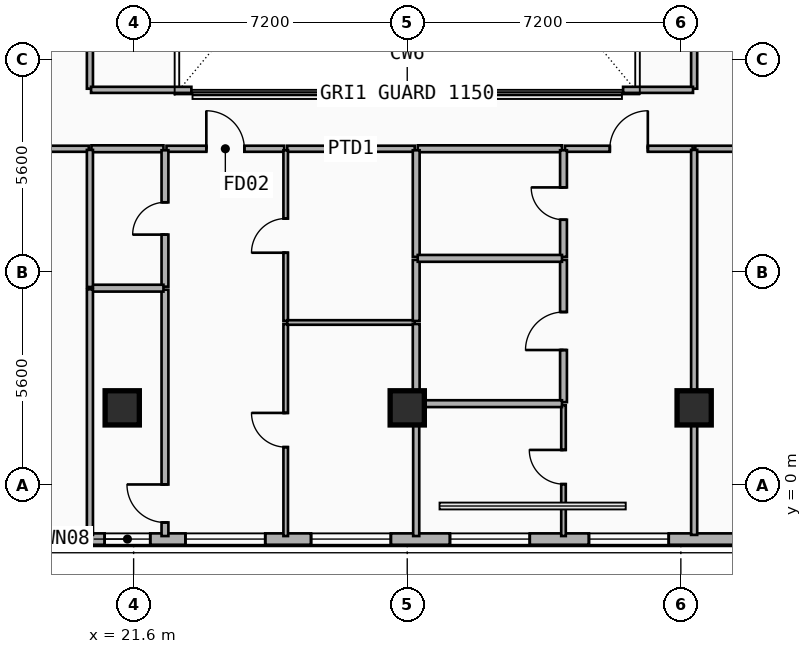
"""IFC4 building model, lengths in metres.
Left out: names, types, materials, properties, quantities, classifications, styles, units other than length and angle.
Written with IfcOpenShell. Run it as: python <this file> out.ifc"""

import sys

from ifc_helpers import new_model, si_unit, direction, frame, frame_2d, origin, origin_2d, place, context, subcontext, project, spatial, rectangle, extrude, element, fill, save


model = new_model("IFC4")
c1 = context("Model", 3, precision=1e-05, world=origin(), true_north=direction((0.0, 1.0)))
c2 = subcontext(c1, "Body", "Model", "MODEL_VIEW")
j1 = project(units=[si_unit("LENGTHUNIT", "METRE"), si_unit("PLANEANGLEUNIT", "RADIAN")], contexts=[c1])
p1 = place(None, origin())
s1 = spatial("IfcSite", under=j1, at=p1, CompositionType="ELEMENT")
p2 = place(p1, origin())
s2 = spatial("IfcBuilding", under=s1, at=p2, CompositionType="ELEMENT")
p3 = place(p2, frame((0.0, 0.0, 265.8)))
s3 = spatial("IfcBuildingStorey", under=s2, at=p3, CompositionType="ELEMENT", Elevation=265.8)
for number, where, z_axis, x_axis in (
    (1, (21.3, 2.141, 0.0), (0.0, -0.09, 0.996), (1.0, 0.0, 0.0)),
    (2, (28.8, 2.141, 0.0), (0.0, -0.09, 0.996), (1.0, 0.0, 0.0)),
    (3, (36.35, 2.141, 0.0), (0.0, -0.09, 0.996), (1.0, 0.0, 0.0)),
):
    element("IfcColumn", number, at=place(p3, frame(where, z_axis=z_axis, x_axis=x_axis)), inside=s3, PredefinedType="COLUMN", context=c2, shape_type="SweptSolid", body=[
        extrude(rectangle(XDim=0.9, YDim=0.9, at=origin_2d()), origin(), (0.0, 0.0, 1.0), 3.715),
    ])
p4 = place(p3, frame((45.2, -1.42, 0.0), z_axis=(0.0, 0.0, 1.0), x_axis=(-1.0, 0.0, 0.0)))
e4 = element("IfcWall", 4, at=p4, inside=s3, PredefinedType="SOLIDWALL", context=c2, shape_type="SweptSolid", body=[
    extrude(rectangle(XDim=32.8, YDim=0.3, at=frame_2d((16.4, 0.0))), origin(), (0.0, 0.0, 1.0), 3.42),
])
p5 = place(p4, frame((27.825, 0.0, 0.75)))
e5 = element("IfcOpeningElement", 5, at=p5, cuts=e4, PredefinedType="OPENING", context=c2, shape_type="SweptSolid", body=[
    extrude(rectangle(XDim=2.1, YDim=2.1, at=frame_2d((1.05, 1.05))), frame((0.0, 0.16, 0.0), z_axis=(0.0, -1.0, 0.0), x_axis=(1.0, 0.0, 0.0)), (0.0, 0.0, 1.0), 0.32),
])
p6 = place(p4, frame((20.136, 0.0, 0.75)))
e6 = element("IfcOpeningElement", 6, at=p6, cuts=e4, PredefinedType="OPENING", context=c2, shape_type="SweptSolid", body=[
    extrude(rectangle(XDim=2.1, YDim=2.1, at=frame_2d((1.05, 1.05))), frame((0.0, 0.16, 0.0), z_axis=(0.0, -1.0, 0.0), x_axis=(1.0, 0.0, 0.0)), (0.0, 0.0, 1.0), 0.32),
])
p7 = place(p4, frame((23.163, 0.0, 0.68)))
e7 = element("IfcOpeningElement", 7, at=p7, cuts=e4, PredefinedType="OPENING", context=c2, shape_type="SweptSolid", body=[
    extrude(rectangle(XDim=1.2, YDim=1.5, at=frame_2d((0.6, 0.75))), frame((0.0, 0.16, 0.0), z_axis=(0.0, -1.0, 0.0), x_axis=(1.0, 0.0, 0.0)), (0.0, 0.0, 1.0), 0.32),
])
p8 = place(p4, frame((16.831, 0.0, 0.75)))
e8 = element("IfcOpeningElement", 8, at=p8, cuts=e4, PredefinedType="OPENING", context=c2, shape_type="SweptSolid", body=[
    extrude(rectangle(XDim=2.1, YDim=2.1, at=frame_2d((1.05, 1.05))), frame((0.0, 0.16, 0.0), z_axis=(0.0, -1.0, 0.0), x_axis=(1.0, 0.0, 0.0)), (0.0, 0.0, 1.0), 0.32),
])
p9 = place(p4, frame((9.519, 0.0, 0.75)))
e9 = element("IfcOpeningElement", 9, at=p9, cuts=e4, PredefinedType="OPENING", context=c2, shape_type="SweptSolid", body=[
    extrude(rectangle(XDim=2.1, YDim=2.1, at=frame_2d((1.05, 1.05))), frame((0.0, 0.16, 0.0), z_axis=(0.0, -1.0, 0.0), x_axis=(1.0, 0.0, 0.0)), (0.0, 0.0, 1.0), 0.32),
])
p10 = place(p4, frame((13.176, 0.0, 0.75)))
e10 = element("IfcOpeningElement", 10, at=p10, cuts=e4, PredefinedType="OPENING", context=c2, shape_type="SweptSolid", body=[
    extrude(rectangle(XDim=2.1, YDim=2.1, at=frame_2d((1.05, 1.05))), frame((0.0, 0.16, 0.0), z_axis=(0.0, -1.0, 0.0), x_axis=(1.0, 0.0, 0.0)), (0.0, 0.0, 1.0), 0.32),
])
p11 = place(p4, frame((2.875, 0.0, 0.75)))
e11 = element("IfcOpeningElement", 11, at=p11, cuts=e4, PredefinedType="OPENING", context=c2, shape_type="SweptSolid", body=[
    extrude(rectangle(XDim=2.1, YDim=2.1, at=frame_2d((1.05, 1.05))), frame((0.0, 0.16, 0.0), z_axis=(0.0, -1.0, 0.0), x_axis=(1.0, 0.0, 0.0)), (0.0, 0.0, 1.0), 0.32),
])
p12 = place(p3, frame((22.465, 8.85, 0.0), z_axis=(0.0, 0.0, 1.0), x_axis=(1.0, 0.0, 0.0)))
e12 = element("IfcWall", 12, at=p12, inside=s3, PredefinedType="PARTITIONING", context=c2, shape_type="SweptSolid", body=[
    extrude(rectangle(XDim=3.097, YDim=0.16, at=frame_2d((1.548, 0.0))), origin(), (0.0, 0.0, 1.0), 3.42),
])
p13 = place(p12, frame((1.049, 0.0, 0.0)))
e13 = element("IfcOpeningElement", 13, at=p13, cuts=e12, PredefinedType="OPENING", context=c2, shape_type="SweptSolid", body=[
    extrude(rectangle(XDim=1.0, YDim=2.15, at=frame_2d((0.5, 1.075))), frame((0.0, 0.09, 0.0), z_axis=(0.0, -1.0, 0.0), x_axis=(1.0, 0.0, 0.0)), (0.0, 0.0, 1.0), 0.18),
])
p14 = place(p3, frame((20.49, 8.85, 0.0), z_axis=(0.0, 0.0, 1.0), x_axis=(1.0, 0.0, 0.0)))
e14 = element("IfcWall", 14, at=p14, inside=s3, PredefinedType="PLUMBINGWALL", context=c2, shape_type="SweptSolid", body=[
    extrude(rectangle(XDim=1.895, YDim=0.18, at=frame_2d((0.948, 0.0))), origin(), (0.0, 0.0, 1.0), 2.7),
])
p15 = place(p3, frame((25.642, 8.85, 0.0), z_axis=(0.0, 0.0, 1.0), x_axis=(1.0, 0.0, 0.0)))
e15 = element("IfcWall", 15, at=p15, inside=s3, PredefinedType="PARTITIONING", context=c2, shape_type="SweptSolid", body=[
    extrude(rectangle(XDim=3.354, YDim=0.16, at=frame_2d((1.677, 0.0))), origin(), (0.0, 0.0, 1.0), 2.7),
])
p16 = place(p3, frame((32.952, 8.85, 0.0), z_axis=(0.0, 0.0, 1.0), x_axis=(1.0, 0.0, 0.0)))
e16 = element("IfcWall", 16, at=p16, inside=s3, PredefinedType="PARTITIONING", context=c2, shape_type="SweptSolid", body=[
    extrude(rectangle(XDim=3.358, YDim=0.16, at=frame_2d((1.679, 0.0))), origin(), (0.0, 0.0, 1.0), 2.7),
])
p17 = place(p16, frame((1.179, 0.0, 0.0)))
e17 = element("IfcOpeningElement", 17, at=p17, cuts=e16, PredefinedType="OPENING", context=c2, shape_type="SweptSolid", body=[
    extrude(rectangle(XDim=1.0, YDim=2.15, at=frame_2d((0.5, 1.075))), frame((0.0, 0.09, 0.0), z_axis=(0.0, -1.0, 0.0), x_axis=(1.0, 0.0, 0.0)), (0.0, 0.0, 1.0), 0.18),
])
p18 = place(p3, frame((29.076, 8.85, 0.0), z_axis=(0.0, 0.0, 1.0), x_axis=(1.0, 0.0, 0.0)))
e18 = element("IfcWall", 18, at=p18, inside=s3, PredefinedType="PLUMBINGWALL", context=c2, shape_type="SweptSolid", body=[
    extrude(rectangle(XDim=3.796, YDim=0.18, at=frame_2d((1.898, 0.0))), origin(), (0.0, 0.0, 1.0), 2.7),
])
p19 = place(p3, frame((22.425, -1.34, 0.0), z_axis=(0.0, 0.0, 1.0), x_axis=(0.0, 1.0, 0.0)))
e19 = element("IfcWall", 19, at=p19, inside=s3, PredefinedType="PLUMBINGWALL", context=c2, shape_type="SweptSolid", body=[
    extrude(rectangle(XDim=6.482, YDim=0.18, at=frame_2d((3.241, 0.0))), origin(), (0.0, 0.0, 1.0), 3.08),
])
p20 = place(p19, frame((0.357, 0.0, 0.0)))
e20 = element("IfcOpeningElement", 20, at=p20, cuts=e19, PredefinedType="OPENING", context=c2, shape_type="SweptSolid", body=[
    extrude(rectangle(XDim=1.0, YDim=2.15, at=frame_2d((0.5, 1.075))), frame((0.0, 0.1, 0.0), z_axis=(0.0, -1.0, 0.0), x_axis=(1.0, 0.0, 0.0)), (0.0, 0.0, 1.0), 0.2),
])
p21 = place(p3, frame((22.425, 5.222, 0.0), z_axis=(0.0, 0.0, 1.0), x_axis=(0.0, 1.0, 0.0)))
e21 = element("IfcWall", 21, at=p21, inside=s3, PredefinedType="PLUMBINGWALL", context=c2, shape_type="SweptSolid", body=[
    extrude(rectangle(XDim=3.588, YDim=0.18, at=frame_2d((1.794, 0.0))), origin(), (0.0, 0.0, 1.0), 3.04),
])
p22 = place(p21, frame((1.369, 0.0, 0.0)))
e22 = element("IfcOpeningElement", 22, at=p22, cuts=e21, PredefinedType="OPENING", context=c2, shape_type="SweptSolid", body=[
    extrude(rectangle(XDim=0.85, YDim=2.1, at=frame_2d((0.425, 1.05))), frame((0.0, 0.1, 0.0), z_axis=(0.0, -1.0, 0.0), x_axis=(1.0, 0.0, 0.0)), (0.0, 0.0, 1.0), 0.2),
])
p23 = place(p3, frame((25.602, -1.34, 0.0), z_axis=(0.0, 0.0, 1.0), x_axis=(0.0, 1.0, 0.0)))
e23 = element("IfcWall", 23, at=p23, inside=s3, PredefinedType="PARTITIONING", context=c2, shape_type="SweptSolid", body=[
    extrude(rectangle(XDim=5.579, YDim=0.12, at=frame_2d((2.79, 0.0))), origin(), (0.0, 0.0, 1.0), 3.08),
])
p24 = place(p23, frame((2.34, 0.0, 0.0)))
e24 = element("IfcOpeningElement", 24, at=p24, cuts=e23, PredefinedType="OPENING", context=c2, shape_type="SweptSolid", body=[
    extrude(rectangle(XDim=0.9, YDim=2.1, at=frame_2d((0.45, 1.05))), frame((0.0, 0.07, 0.0), z_axis=(0.0, -1.0, 0.0), x_axis=(1.0, 0.0, 0.0)), (0.0, 0.0, 1.0), 0.14),
])
p25 = place(p3, frame((25.602, 4.319, 0.0), z_axis=(0.0, 0.0, 1.0), x_axis=(0.0, 1.0, 0.0)))
e25 = element("IfcWall", 25, at=p25, inside=s3, PredefinedType="PARTITIONING", context=c2, shape_type="SweptSolid", body=[
    extrude(rectangle(XDim=4.491, YDim=0.12, at=frame_2d((2.246, 0.0))), origin(), (0.0, 0.0, 1.0), 3.04),
])
p26 = place(p25, frame((1.795, 0.0, 0.0)))
e26 = element("IfcOpeningElement", 26, at=p26, cuts=e25, PredefinedType="OPENING", context=c2, shape_type="SweptSolid", body=[
    extrude(rectangle(XDim=0.9, YDim=2.1, at=frame_2d((0.45, 1.05))), frame((0.0, 0.07, 0.0), z_axis=(0.0, -1.0, 0.0), x_axis=(1.0, 0.0, 0.0)), (0.0, 0.0, 1.0), 0.14),
])
p27 = place(p3, frame((20.49, 5.182, 0.0), z_axis=(0.0, 0.0, 1.0), x_axis=(1.0, 0.0, 0.0)))
e27 = element("IfcWall", 27, at=p27, inside=s3, PredefinedType="PLUMBINGWALL", context=c2, shape_type="SweptSolid", body=[
    extrude(rectangle(XDim=1.895, YDim=0.18, at=frame_2d((0.948, 0.0))), origin(), (0.0, 0.0, 1.0), 2.7),
])
p28 = place(p3, frame((25.642, 4.279, 0.0), z_axis=(0.0, 0.0, 1.0), x_axis=(1.0, 0.0, 0.0)))
e28 = element("IfcWall", 28, at=p28, inside=s3, PredefinedType="PARTITIONING", context=c2, shape_type="SweptSolid", body=[
    extrude(rectangle(XDim=3.354, YDim=0.12, at=frame_2d((1.677, 0.0))), origin(), (0.0, 0.0, 1.0), 2.7),
])
p29 = place(p3, frame((29.036, -1.34, 0.0), z_axis=(0.0, 0.0, 1.0), x_axis=(0.0, 1.0, 0.0)))
e29 = element("IfcWall", 29, at=p29, inside=s3, PredefinedType="PARTITIONING", context=c2, shape_type="SweptSolid", body=[
    extrude(rectangle(XDim=3.443, YDim=0.16, at=frame_2d((1.722, 0.0))), origin(), (0.0, 0.0, 1.0), 2.7),
])
p30 = place(p3, frame((29.036, 2.183, 0.0), z_axis=(0.0, 0.0, 1.0), x_axis=(0.0, 1.0, 0.0)))
e30 = element("IfcWall", 30, at=p30, inside=s3, PredefinedType="PLUMBINGWALL", context=c2, shape_type="SweptSolid", body=[
    extrude(rectangle(XDim=2.056, YDim=0.18, at=frame_2d((1.028, 0.0))), origin(), (0.0, 0.0, 1.0), 2.7),
])
p31 = place(p3, frame((29.036, 4.319, 0.0), z_axis=(0.0, 0.0, 1.0), x_axis=(0.0, 1.0, 0.0)))
e31 = element("IfcWall", 31, at=p31, inside=s3, PredefinedType="PLUMBINGWALL", context=c2, shape_type="SweptSolid", body=[
    extrude(rectangle(XDim=1.607, YDim=0.18, at=frame_2d((0.803, 0.0))), origin(), (0.0, 0.0, 1.0), 2.7),
])
p32 = place(p3, frame((29.036, 6.006, 0.0), z_axis=(0.0, 0.0, 1.0), x_axis=(0.0, 1.0, 0.0)))
e32 = element("IfcWall", 32, at=p32, inside=s3, PredefinedType="PLUMBINGWALL", context=c2, shape_type="SweptSolid", body=[
    extrude(rectangle(XDim=2.804, YDim=0.18, at=frame_2d((1.402, 0.0))), origin(), (0.0, 0.0, 1.0), 2.7),
])
p33 = place(p3, frame((32.912, -1.34, 0.0), z_axis=(0.0, 0.0, 1.0), x_axis=(0.0, 1.0, 0.0)))
e33 = element("IfcWall", 33, at=p33, inside=s3, PredefinedType="PARTITIONING", context=c2, shape_type="SweptSolid", body=[
    extrude(rectangle(XDim=3.443, YDim=0.12, at=frame_2d((1.722, 0.0))), origin(), (0.0, 0.0, 1.0), 3.08),
])
p34 = place(p33, frame((1.366, 0.0, 0.0)))
e34 = element("IfcOpeningElement", 34, at=p34, cuts=e33, PredefinedType="OPENING", context=c2, shape_type="SweptSolid", body=[
    extrude(rectangle(XDim=0.9, YDim=2.1, at=frame_2d((0.45, 1.05))), frame((0.0, 0.07, 0.0), z_axis=(0.0, -1.0, 0.0), x_axis=(1.0, 0.0, 0.0)), (0.0, 0.0, 1.0), 0.14),
])
p35 = place(p3, frame((32.912, 2.183, 0.0), z_axis=(0.0, 0.0, 1.0), x_axis=(0.0, 1.0, 0.0)))
e35 = element("IfcWall", 35, at=p35, inside=s3, PredefinedType="PLUMBINGWALL", context=c2, shape_type="SweptSolid", body=[
    extrude(rectangle(XDim=3.743, YDim=0.18, at=frame_2d((1.872, 0.0))), origin(), (0.0, 0.0, 1.0), 3.04),
])
p36 = place(p35, frame((1.372, 0.0, 0.0)))
e36 = element("IfcOpeningElement", 36, at=p36, cuts=e35, PredefinedType="OPENING", context=c2, shape_type="SweptSolid", body=[
    extrude(rectangle(XDim=1.0, YDim=2.15, at=frame_2d((0.5, 1.075))), frame((0.0, 0.1, 0.0), z_axis=(0.0, -1.0, 0.0), x_axis=(1.0, 0.0, 0.0)), (0.0, 0.0, 1.0), 0.2),
])
p37 = place(p3, frame((32.912, 6.006, 0.0), z_axis=(0.0, 0.0, 1.0), x_axis=(0.0, 1.0, 0.0)))
e37 = element("IfcWall", 37, at=p37, inside=s3, PredefinedType="PLUMBINGWALL", context=c2, shape_type="SweptSolid", body=[
    extrude(rectangle(XDim=2.804, YDim=0.18, at=frame_2d((1.402, 0.0))), origin(), (0.0, 0.0, 1.0), 3.04),
])
p38 = place(p37, frame((0.977, 0.0, 0.0)))
e38 = element("IfcOpeningElement", 38, at=p38, cuts=e37, PredefinedType="OPENING", context=c2, shape_type="SweptSolid", body=[
    extrude(rectangle(XDim=0.85, YDim=2.1, at=frame_2d((0.425, 1.05))), frame((0.0, 0.1, 0.0), z_axis=(0.0, -1.0, 0.0), x_axis=(1.0, 0.0, 0.0)), (0.0, 0.0, 1.0), 0.2),
])
for number, where, z_axis, x_axis in (
    (39, (29.076, 2.143, 0.0), (0.0, 0.0, 1.0), (1.0, 0.0, 0.0)),
    (40, (29.076, 5.966, 0.0), (0.0, 0.0, 1.0), (1.0, 0.0, 0.0)),
):
    element("IfcWall", number, at=place(p3, frame(where, z_axis=z_axis, x_axis=x_axis)), inside=s3, PredefinedType="PLUMBINGWALL", context=c2, shape_type="SweptSolid", body=[
        extrude(rectangle(XDim=3.796, YDim=0.18, at=frame_2d((1.898, 0.0))), origin(), (0.0, 0.0, 1.0), 2.7),
    ])
p39 = place(p3, frame((18.88, 8.85, 0.0), z_axis=(0.0, 0.0, 1.0), x_axis=(1.0, 0.0, 0.0)))
e41 = element("IfcWall", 41, at=p39, inside=s3, PredefinedType="PARTITIONING", context=c2, shape_type="SweptSolid", body=[
    extrude(rectangle(XDim=1.54, YDim=0.16, at=frame_2d((0.77, 0.0))), origin(), (0.0, 0.0, 1.0), 3.42),
])
p40 = place(p3, frame((20.45, 10.43, 0.0), z_axis=(0.0, 0.0, 1.0), x_axis=(0.0, 1.0, 0.0)))
e42 = element("IfcWall", 42, at=p40, inside=s3, PredefinedType="PARTITIONING", context=c2, shape_type="SweptSolid", body=[
    extrude(rectangle(XDim=14.99, YDim=0.16, at=frame_2d((7.495, 0.0))), origin(), (0.0, 0.0, 1.0), 2.91),
])
p41 = place(p3, frame((36.38, 8.85, 0.0), z_axis=(0.0, 0.0, 1.0), x_axis=(1.0, 0.0, 0.0)))
e43 = element("IfcWall", 43, at=p41, inside=s3, PredefinedType="PARTITIONING", context=c2, shape_type="SweptSolid", body=[
    extrude(rectangle(XDim=1.94, YDim=0.16, at=frame_2d((0.97, 0.0))), origin(), (0.0, 0.0, 1.0), 2.7),
])
p42 = place(p3, frame((36.35, 10.43, 0.0), z_axis=(0.0, 0.0, 1.0), x_axis=(0.0, 1.0, 0.0)))
e44 = element("IfcWall", 44, at=p42, inside=s3, PredefinedType="PARTITIONING", context=c2, shape_type="SweptSolid", body=[
    extrude(rectangle(XDim=14.99, YDim=0.16, at=frame_2d((7.495, 0.0))), origin(), (0.0, 0.0, 1.0), 2.7),
])
p43 = place(p3, frame((20.48, 10.4, 0.0), z_axis=(0.0, 0.0, 1.0), x_axis=(1.0, 0.0, 0.0)))
e45 = element("IfcWall", 45, at=p43, inside=s3, PredefinedType="PARTITIONING", context=c2, shape_type="SweptSolid", body=[
    extrude(rectangle(XDim=2.64, YDim=0.16, at=frame_2d((1.32, 0.0))), origin(), (0.0, 0.0, 1.0), 2.7),
])
p44 = place(p3, frame((34.48, 10.4, 0.0), z_axis=(0.0, 0.0, 1.0), x_axis=(1.0, 0.0, 0.0)))
e46 = element("IfcWall", 46, at=p44, inside=s3, PredefinedType="PARTITIONING", context=c2, shape_type="SweptSolid", body=[
    extrude(rectangle(XDim=1.84, YDim=0.16, at=frame_2d((0.92, 0.0))), origin(), (0.0, 0.0, 1.0), 2.7),
])
p45 = place(p3, frame((20.45, -1.31, 0.0), z_axis=(0.0, 0.0, 1.0), x_axis=(0.0, 1.0, 0.0)))
e47 = element("IfcWall", 47, at=p45, inside=s3, PredefinedType="PARTITIONING", context=c2, shape_type="SweptSolid", body=[
    extrude(rectangle(XDim=6.462, YDim=0.16, at=frame_2d((3.231, 0.0))), origin(), (0.0, 0.0, 1.0), 3.08),
])
p46 = place(p3, frame((20.45, 5.212, 0.0), z_axis=(0.0, 0.0, 1.0), x_axis=(0.0, 1.0, 0.0)))
e48 = element("IfcWall", 48, at=p46, inside=s3, PredefinedType="PARTITIONING", context=c2, shape_type="SweptSolid", body=[
    extrude(rectangle(XDim=3.608, YDim=0.16, at=frame_2d((1.804, 0.0))), origin(), (0.0, 0.0, 1.0), 2.91),
])
p47 = place(p3, frame((36.35, -1.31, 0.0), z_axis=(0.0, 0.0, 1.0), x_axis=(0.0, 1.0, 0.0)))
e49 = element("IfcWall", 49, at=p47, inside=s3, PredefinedType="PARTITIONING", context=c2, shape_type="SweptSolid", body=[
    extrude(rectangle(XDim=10.13, YDim=0.16, at=frame_2d((5.065, 0.0))), origin(), (0.0, 0.0, 1.0), 2.7),
])
p48 = place(p6, origin())
e50 = element("IfcWindow", 50, at=p48, inside=s3, PartitioningType="SINGLE_PANEL", PredefinedType="WINDOW", context=c2, shape_type="SweptSolid", body=[
    extrude(rectangle(XDim=2.1, YDim=2.1, at=frame_2d((1.05, 1.05))), frame((0.0, 0.03, 0.0), z_axis=(0.0, -1.0, 0.0), x_axis=(1.0, 0.0, 0.0)), (0.0, 0.0, 1.0), 0.06),
])
fill(e6, e50)
p49 = place(p7, origin())
e51 = element("IfcWindow", 51, at=p49, inside=s3, PartitioningType="SINGLE_PANEL", PredefinedType="WINDOW", context=c2, shape_type="SweptSolid", body=[
    extrude(rectangle(XDim=1.2, YDim=1.5, at=frame_2d((0.6, 0.75))), frame((0.0, 0.03, 0.0), z_axis=(0.0, -1.0, 0.0), x_axis=(1.0, 0.0, 0.0)), (0.0, 0.0, 1.0), 0.06),
])
fill(e7, e51)
p50 = place(p8, origin())
e52 = element("IfcWindow", 52, at=p50, inside=s3, PartitioningType="SINGLE_PANEL", PredefinedType="WINDOW", context=c2, shape_type="SweptSolid", body=[
    extrude(rectangle(XDim=2.1, YDim=2.1, at=frame_2d((1.05, 1.05))), frame((0.0, 0.03, 0.0), z_axis=(0.0, -1.0, 0.0), x_axis=(1.0, 0.0, 0.0)), (0.0, 0.0, 1.0), 0.06),
])
fill(e8, e52)
p51 = place(p9, origin())
e53 = element("IfcWindow", 53, at=p51, inside=s3, PartitioningType="SINGLE_PANEL", PredefinedType="WINDOW", context=c2, shape_type="SweptSolid", body=[
    extrude(rectangle(XDim=2.1, YDim=2.1, at=frame_2d((1.05, 1.05))), frame((0.0, 0.03, 0.0), z_axis=(0.0, -1.0, 0.0), x_axis=(1.0, 0.0, 0.0)), (0.0, 0.0, 1.0), 0.06),
])
fill(e9, e53)
p52 = place(p10, origin())
e54 = element("IfcWindow", 54, at=p52, inside=s3, PartitioningType="SINGLE_PANEL", PredefinedType="WINDOW", context=c2, shape_type="SweptSolid", body=[
    extrude(rectangle(XDim=2.1, YDim=2.1, at=frame_2d((1.05, 1.05))), frame((0.0, 0.03, 0.0), z_axis=(0.0, -1.0, 0.0), x_axis=(1.0, 0.0, 0.0)), (0.0, 0.0, 1.0), 0.06),
])
fill(e10, e54)
p53 = place(p13, origin())
e55 = element("IfcDoor", 55, at=p53, inside=s3, OperationType="SINGLE_SWING_LEFT", PredefinedType="DOOR", context=c2, shape_type="SweptSolid", body=[
    extrude(rectangle(XDim=1.0, YDim=2.15, at=frame_2d((0.5, 1.075))), frame((0.0, 0.025, 0.0), z_axis=(0.0, -1.0, 0.0), x_axis=(1.0, 0.0, 0.0)), (0.0, 0.0, 1.0), 0.05),
])
fill(e13, e55)
p54 = place(p17, origin())
e56 = element("IfcDoor", 56, at=p54, inside=s3, OperationType="SINGLE_SWING_RIGHT", PredefinedType="DOOR", context=c2, shape_type="SweptSolid", body=[
    extrude(rectangle(XDim=1.0, YDim=2.15, at=frame_2d((0.5, 1.075))), frame((0.0, 0.025, 0.0), z_axis=(0.0, -1.0, 0.0), x_axis=(1.0, 0.0, 0.0)), (0.0, 0.0, 1.0), 0.05),
])
fill(e17, e56)
p55 = place(p20, origin())
e57 = element("IfcDoor", 57, at=p55, inside=s3, OperationType="SINGLE_SWING_RIGHT", PredefinedType="DOOR", context=c2, shape_type="SweptSolid", body=[
    extrude(rectangle(XDim=1.0, YDim=2.15, at=frame_2d((0.5, 1.075))), frame((0.0, 0.025, 0.0), z_axis=(0.0, -1.0, 0.0), x_axis=(1.0, 0.0, 0.0)), (0.0, 0.0, 1.0), 0.05),
])
fill(e20, e57)
p56 = place(p22, origin())
e58 = element("IfcDoor", 58, at=p56, inside=s3, OperationType="SINGLE_SWING_LEFT", PredefinedType="DOOR", context=c2, shape_type="SweptSolid", body=[
    extrude(rectangle(XDim=0.85, YDim=2.1, at=frame_2d((0.425, 1.05))), frame((0.0, 0.025, 0.0), z_axis=(0.0, -1.0, 0.0), x_axis=(1.0, 0.0, 0.0)), (0.0, 0.0, 1.0), 0.05),
])
fill(e22, e58)
p57 = place(p24, origin())
e59 = element("IfcDoor", 59, at=p57, inside=s3, OperationType="SINGLE_SWING_RIGHT", PredefinedType="DOOR", context=c2, shape_type="SweptSolid", body=[
    extrude(rectangle(XDim=0.9, YDim=2.1, at=frame_2d((0.45, 1.05))), frame((0.0, 0.025, 0.0), z_axis=(0.0, -1.0, 0.0), x_axis=(1.0, 0.0, 0.0)), (0.0, 0.0, 1.0), 0.05),
])
fill(e24, e59)
p58 = place(p26, origin())
e60 = element("IfcDoor", 60, at=p58, inside=s3, OperationType="SINGLE_SWING_LEFT", PredefinedType="DOOR", context=c2, shape_type="SweptSolid", body=[
    extrude(rectangle(XDim=0.9, YDim=2.1, at=frame_2d((0.45, 1.05))), frame((0.0, 0.025, 0.0), z_axis=(0.0, -1.0, 0.0), x_axis=(1.0, 0.0, 0.0)), (0.0, 0.0, 1.0), 0.05),
])
fill(e26, e60)
p59 = place(p34, origin())
e61 = element("IfcDoor", 61, at=p59, inside=s3, OperationType="SINGLE_SWING_RIGHT", PredefinedType="DOOR", context=c2, shape_type="SweptSolid", body=[
    extrude(rectangle(XDim=0.9, YDim=2.1, at=frame_2d((0.45, 1.05))), frame((0.0, 0.025, 0.0), z_axis=(0.0, -1.0, 0.0), x_axis=(1.0, 0.0, 0.0)), (0.0, 0.0, 1.0), 0.05),
])
fill(e34, e61)
p60 = place(p36, origin())
e62 = element("IfcDoor", 62, at=p60, inside=s3, OperationType="SINGLE_SWING_LEFT", PredefinedType="DOOR", context=c2, shape_type="SweptSolid", body=[
    extrude(rectangle(XDim=1.0, YDim=2.15, at=frame_2d((0.5, 1.075))), frame((0.0, 0.025, 0.0), z_axis=(0.0, -1.0, 0.0), x_axis=(1.0, 0.0, 0.0)), (0.0, 0.0, 1.0), 0.05),
])
fill(e36, e62)
p61 = place(p38, origin())
e63 = element("IfcDoor", 63, at=p61, inside=s3, OperationType="SINGLE_SWING_RIGHT", PredefinedType="DOOR", context=c2, shape_type="SweptSolid", body=[
    extrude(rectangle(XDim=0.85, YDim=2.1, at=frame_2d((0.425, 1.05))), frame((0.0, 0.025, 0.0), z_axis=(0.0, -1.0, 0.0), x_axis=(1.0, 0.0, 0.0)), (0.0, 0.0, 1.0), 0.05),
])
fill(e38, e63)
save(model, sys.argv[1])
